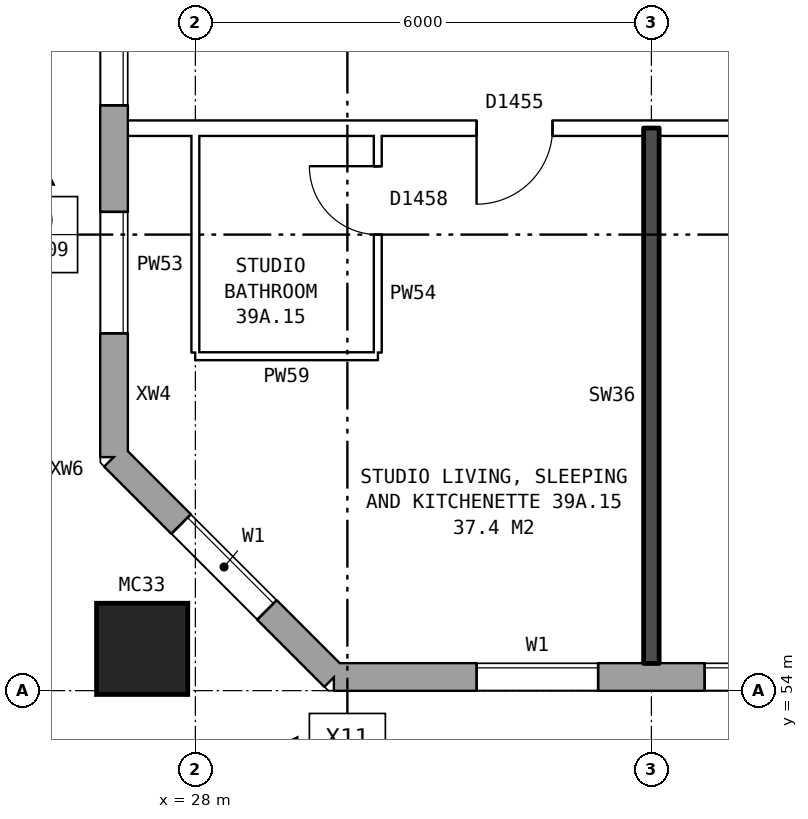
"""IFC4 building model, lengths in metres.
Left out: names, types, materials, properties, quantities, classifications, styles, units other than length and angle.
Written with IfcOpenShell. Run it as: python <this file> out.ifc"""

import sys

from ifc_helpers import new_model, si_unit, direction, frame, frame_2d, origin, origin_2d, place, context, subcontext, project, spatial, rectangle, hollow_rectangle, extrude, element, fill, save


model = new_model("IFC4")
c1 = context("Model", 3, precision=1e-05, world=origin(), true_north=direction((0.0, 1.0)))
c2 = subcontext(c1, "Body", "Model", "MODEL_VIEW")
j1 = project(units=[si_unit("LENGTHUNIT", "METRE"), si_unit("PLANEANGLEUNIT", "RADIAN")], contexts=[c1])
p1 = place(None, origin())
s1 = spatial("IfcSite", under=j1, at=p1, CompositionType="ELEMENT")
p2 = place(p1, origin())
s2 = spatial("IfcBuilding", under=s1, at=p2, CompositionType="ELEMENT")
p3 = place(p2, frame((0.0, 0.0, 139.2)))
s3 = spatial("IfcBuildingStorey", under=s2, at=p3, CompositionType="ELEMENT", Elevation=139.2)
p4 = place(p3, frame((27.3, 54.55, 0.0), z_axis=(0.0, 0.0, 1.0), x_axis=(1.0, 0.0, 0.0)))
e1 = element("IfcColumn", 1, at=p4, inside=s3, PredefinedType="COLUMN", context=c2, shape_type="SweptSolid", body=[
    extrude(hollow_rectangle(XDim=1.2, YDim=1.2, WallThickness=0.065, at=origin_2d()), origin(), (0.0, 0.0, 1.0), 3.1),
])
p5 = place(p3, frame((26.93, 57.075, 0.0), z_axis=(0.0, 0.0, 1.0), x_axis=(0.707106781187, -0.707106781187, 0.0)))
e2 = element("IfcWall", 2, at=p5, inside=s3, PredefinedType="STANDARD", context=c2, shape_type="SweptSolid", body=[
    extrude(rectangle(XDim=4.094, YDim=0.36, at=frame_2d((2.047, 0.0))), origin(), (0.0, 0.0, 1.0), 2.85),
])
p6 = place(p5, frame((1.247, 0.0, 0.8)))
e3 = element("IfcOpeningElement", 3, at=p6, cuts=e2, PredefinedType="OPENING", context=c2, shape_type="SweptSolid", body=[
    extrude(rectangle(XDim=1.6, YDim=1.8, at=frame_2d((0.8, 0.9))), frame((0.0, 0.19, 0.0), z_axis=(0.0, -1.0, 0.0), x_axis=(1.0, 0.0, 0.0)), (0.0, 0.0, 1.0), 0.38),
])
p7 = place(p3, frame((29.825, 54.18, 0.0), z_axis=(0.0, 0.0, 1.0), x_axis=(1.0, 0.0, 0.0)))
e4 = element("IfcWall", 4, at=p7, inside=s3, PredefinedType="STANDARD", context=c2, shape_type="SweptSolid", body=[
    extrude(rectangle(XDim=43.101, YDim=0.36, at=frame_2d((21.55, 0.0))), origin(), (0.0, 0.0, 1.0), 2.85),
])
p8 = place(p7, frame((1.875, 0.0, 0.8)))
e5 = element("IfcOpeningElement", 5, at=p8, cuts=e4, PredefinedType="OPENING", context=c2, shape_type="SweptSolid", body=[
    extrude(rectangle(XDim=1.6, YDim=1.8, at=frame_2d((0.8, 0.9))), frame((0.0, 0.19, 0.0), z_axis=(0.0, -1.0, 0.0), x_axis=(1.0, 0.0, 0.0)), (0.0, 0.0, 1.0), 0.38),
])
p9 = place(p7, frame((4.875, 0.0, 0.8)))
e6 = element("IfcOpeningElement", 6, at=p9, cuts=e4, PredefinedType="OPENING", context=c2, shape_type="SweptSolid", body=[
    extrude(rectangle(XDim=1.6, YDim=1.8, at=frame_2d((0.8, 0.9))), frame((0.0, 0.19, 0.0), z_axis=(0.0, -1.0, 0.0), x_axis=(1.0, 0.0, 0.0)), (0.0, 0.0, 1.0), 0.38),
])
p10 = place(p7, frame((7.875, 0.0, 0.8)))
e7 = element("IfcOpeningElement", 7, at=p10, cuts=e4, PredefinedType="OPENING", context=c2, shape_type="SweptSolid", body=[
    extrude(rectangle(XDim=1.6, YDim=1.8, at=frame_2d((0.8, 0.9))), frame((0.0, 0.19, 0.0), z_axis=(0.0, -1.0, 0.0), x_axis=(1.0, 0.0, 0.0)), (0.0, 0.0, 1.0), 0.38),
])
p11 = place(p7, frame((10.875, 0.0, 0.8)))
e8 = element("IfcOpeningElement", 8, at=p11, cuts=e4, PredefinedType="OPENING", context=c2, shape_type="SweptSolid", body=[
    extrude(rectangle(XDim=1.6, YDim=1.8, at=frame_2d((0.8, 0.9))), frame((0.0, 0.19, 0.0), z_axis=(0.0, -1.0, 0.0), x_axis=(1.0, 0.0, 0.0)), (0.0, 0.0, 1.0), 0.38),
])
p12 = place(p7, frame((13.875, 0.0, 0.8)))
e9 = element("IfcOpeningElement", 9, at=p12, cuts=e4, PredefinedType="OPENING", context=c2, shape_type="SweptSolid", body=[
    extrude(rectangle(XDim=1.6, YDim=1.8, at=frame_2d((0.8, 0.9))), frame((0.0, 0.19, 0.0), z_axis=(0.0, -1.0, 0.0), x_axis=(1.0, 0.0, 0.0)), (0.0, 0.0, 1.0), 0.38),
])
p13 = place(p7, frame((16.875, 0.0, 0.8)))
e10 = element("IfcOpeningElement", 10, at=p13, cuts=e4, PredefinedType="OPENING", context=c2, shape_type="SweptSolid", body=[
    extrude(rectangle(XDim=1.6, YDim=1.8, at=frame_2d((0.8, 0.9))), frame((0.0, 0.19, 0.0), z_axis=(0.0, -1.0, 0.0), x_axis=(1.0, 0.0, 0.0)), (0.0, 0.0, 1.0), 0.38),
])
p14 = place(p7, frame((20.975, 0.0, 0.15)))
e11 = element("IfcOpeningElement", 11, at=p14, cuts=e4, PredefinedType="OPENING", context=c2, shape_type="SweptSolid", body=[
    extrude(rectangle(XDim=1.0, YDim=1.5, at=frame_2d((0.5, 0.75))), frame((0.0, 0.19, 0.0), z_axis=(0.0, -1.0, 0.0), x_axis=(1.0, 0.0, 0.0)), (0.0, 0.0, 1.0), 0.38),
])
p15 = place(p7, frame((23.225, 0.0, 1.7)))
e12 = element("IfcOpeningElement", 12, at=p15, cuts=e4, PredefinedType="OPENING", context=c2, shape_type="SweptSolid", body=[
    extrude(rectangle(XDim=0.6, YDim=0.9, at=frame_2d((0.3, 0.45))), frame((0.0, 0.19, 0.0), z_axis=(0.0, -1.0, 0.0), x_axis=(1.0, 0.0, 0.0)), (0.0, 0.0, 1.0), 0.38),
])
p16 = place(p7, frame((25.875, 0.0, 0.8)))
e13 = element("IfcOpeningElement", 13, at=p16, cuts=e4, PredefinedType="OPENING", context=c2, shape_type="SweptSolid", body=[
    extrude(rectangle(XDim=1.6, YDim=1.8, at=frame_2d((0.8, 0.9))), frame((0.0, 0.19, 0.0), z_axis=(0.0, -1.0, 0.0), x_axis=(1.0, 0.0, 0.0)), (0.0, 0.0, 1.0), 0.38),
])
p17 = place(p7, frame((28.875, 0.0, 0.8)))
e14 = element("IfcOpeningElement", 14, at=p17, cuts=e4, PredefinedType="OPENING", context=c2, shape_type="SweptSolid", body=[
    extrude(rectangle(XDim=1.6, YDim=1.8, at=frame_2d((0.8, 0.9))), frame((0.0, 0.19, 0.0), z_axis=(0.0, -1.0, 0.0), x_axis=(1.0, 0.0, 0.0)), (0.0, 0.0, 1.0), 0.38),
])
p18 = place(p7, frame((31.875, 0.0, 0.8)))
e15 = element("IfcOpeningElement", 15, at=p18, cuts=e4, PredefinedType="OPENING", context=c2, shape_type="SweptSolid", body=[
    extrude(rectangle(XDim=1.6, YDim=1.8, at=frame_2d((0.8, 0.9))), frame((0.0, 0.19, 0.0), z_axis=(0.0, -1.0, 0.0), x_axis=(1.0, 0.0, 0.0)), (0.0, 0.0, 1.0), 0.38),
])
p19 = place(p7, frame((34.875, 0.0, 0.8)))
e16 = element("IfcOpeningElement", 16, at=p19, cuts=e4, PredefinedType="OPENING", context=c2, shape_type="SweptSolid", body=[
    extrude(rectangle(XDim=1.6, YDim=1.8, at=frame_2d((0.8, 0.9))), frame((0.0, 0.19, 0.0), z_axis=(0.0, -1.0, 0.0), x_axis=(1.0, 0.0, 0.0)), (0.0, 0.0, 1.0), 0.38),
])
p20 = place(p7, frame((37.875, 0.0, 0.8)))
e17 = element("IfcOpeningElement", 17, at=p20, cuts=e4, PredefinedType="OPENING", context=c2, shape_type="SweptSolid", body=[
    extrude(rectangle(XDim=1.6, YDim=1.8, at=frame_2d((0.8, 0.9))), frame((0.0, 0.19, 0.0), z_axis=(0.0, -1.0, 0.0), x_axis=(1.0, 0.0, 0.0)), (0.0, 0.0, 1.0), 0.38),
])
p21 = place(p7, frame((40.875, 0.0, 0.8)))
e18 = element("IfcOpeningElement", 18, at=p21, cuts=e4, PredefinedType="OPENING", context=c2, shape_type="SweptSolid", body=[
    extrude(rectangle(XDim=1.6, YDim=1.8, at=frame_2d((0.8, 0.9))), frame((0.0, 0.19, 0.0), z_axis=(0.0, -1.0, 0.0), x_axis=(1.0, 0.0, 0.0)), (0.0, 0.0, 1.0), 0.38),
])
p22 = place(p7, frame((24.225, 0.0, 0.8)))
e19 = element("IfcOpeningElement", 19, at=p22, cuts=e4, PredefinedType="OPENING", context=c2, shape_type="SweptSolid", body=[
    extrude(rectangle(XDim=0.8, YDim=1.8, at=frame_2d((0.4, 0.9))), frame((0.0, 0.19, 0.0), z_axis=(0.0, -1.0, 0.0), x_axis=(1.0, 0.0, 0.0)), (0.0, 0.0, 1.0), 0.38),
])
p23 = place(p3, frame((26.93, 82.925, 0.0), z_axis=(0.0, 0.0, 1.0), x_axis=(0.0, -1.0, 0.0)))
e20 = element("IfcWall", 20, at=p23, inside=s3, PredefinedType="STANDARD", context=c2, shape_type="SweptSolid", body=[
    extrude(rectangle(XDim=25.851, YDim=0.36, at=frame_2d((12.925, 0.0))), origin(), (0.0, 0.0, 1.0), 2.85),
])
p24 = place(p23, frame((1.625, 0.0, 0.8)))
e21 = element("IfcOpeningElement", 21, at=p24, cuts=e20, PredefinedType="OPENING", context=c2, shape_type="SweptSolid", body=[
    extrude(rectangle(XDim=1.6, YDim=1.8, at=frame_2d((0.8, 0.9))), frame((0.0, 0.19, 0.0), z_axis=(0.0, -1.0, 0.0), x_axis=(1.0, 0.0, 0.0)), (0.0, 0.0, 1.0), 0.38),
])
p25 = place(p23, frame((4.625, 0.0, 0.8)))
e22 = element("IfcOpeningElement", 22, at=p25, cuts=e20, PredefinedType="OPENING", context=c2, shape_type="SweptSolid", body=[
    extrude(rectangle(XDim=1.6, YDim=1.8, at=frame_2d((0.8, 0.9))), frame((0.0, 0.19, 0.0), z_axis=(0.0, -1.0, 0.0), x_axis=(1.0, 0.0, 0.0)), (0.0, 0.0, 1.0), 0.38),
])
p26 = place(p23, frame((7.625, 0.0, 0.8)))
e23 = element("IfcOpeningElement", 23, at=p26, cuts=e20, PredefinedType="OPENING", context=c2, shape_type="SweptSolid", body=[
    extrude(rectangle(XDim=1.6, YDim=1.8, at=frame_2d((0.8, 0.9))), frame((0.0, 0.19, 0.0), z_axis=(0.0, -1.0, 0.0), x_axis=(1.0, 0.0, 0.0)), (0.0, 0.0, 1.0), 0.38),
])
p27 = place(p23, frame((10.625, 0.0, 0.8)))
e24 = element("IfcOpeningElement", 24, at=p27, cuts=e20, PredefinedType="OPENING", context=c2, shape_type="SweptSolid", body=[
    extrude(rectangle(XDim=1.6, YDim=1.8, at=frame_2d((0.8, 0.9))), frame((0.0, 0.19, 0.0), z_axis=(0.0, -1.0, 0.0), x_axis=(1.0, 0.0, 0.0)), (0.0, 0.0, 1.0), 0.38),
])
p28 = place(p23, frame((13.625, 0.0, 0.8)))
e25 = element("IfcOpeningElement", 25, at=p28, cuts=e20, PredefinedType="OPENING", context=c2, shape_type="SweptSolid", body=[
    extrude(rectangle(XDim=1.6, YDim=1.8, at=frame_2d((0.8, 0.9))), frame((0.0, 0.19, 0.0), z_axis=(0.0, -1.0, 0.0), x_axis=(1.0, 0.0, 0.0)), (0.0, 0.0, 1.0), 0.38),
])
p29 = place(p23, frame((16.625, 0.0, 0.8)))
e26 = element("IfcOpeningElement", 26, at=p29, cuts=e20, PredefinedType="OPENING", context=c2, shape_type="SweptSolid", body=[
    extrude(rectangle(XDim=1.6, YDim=1.8, at=frame_2d((0.8, 0.9))), frame((0.0, 0.19, 0.0), z_axis=(0.0, -1.0, 0.0), x_axis=(1.0, 0.0, 0.0)), (0.0, 0.0, 1.0), 0.38),
])
p30 = place(p23, frame((19.625, 0.0, 0.8)))
e27 = element("IfcOpeningElement", 27, at=p30, cuts=e20, PredefinedType="OPENING", context=c2, shape_type="SweptSolid", body=[
    extrude(rectangle(XDim=1.6, YDim=1.8, at=frame_2d((0.8, 0.9))), frame((0.0, 0.19, 0.0), z_axis=(0.0, -1.0, 0.0), x_axis=(1.0, 0.0, 0.0)), (0.0, 0.0, 1.0), 0.38),
])
p31 = place(p23, frame((22.625, 0.0, 0.8)))
e28 = element("IfcOpeningElement", 28, at=p31, cuts=e20, PredefinedType="OPENING", context=c2, shape_type="SweptSolid", body=[
    extrude(rectangle(XDim=1.6, YDim=1.8, at=frame_2d((0.8, 0.9))), frame((0.0, 0.19, 0.0), z_axis=(0.0, -1.0, 0.0), x_axis=(1.0, 0.0, 0.0)), (0.0, 0.0, 1.0), 0.38),
])
p32 = place(p3, frame((28.0, 58.4, 0.0), z_axis=(0.0, 0.0, 1.0), x_axis=(1.0, 0.0, 0.0)))
e29 = element("IfcWall", 29, at=p32, inside=s3, PredefinedType="PARTITIONING", context=c2, shape_type="SweptSolid", body=[
    extrude(rectangle(XDim=2.4, YDim=0.1, at=frame_2d((1.2, 0.0))), origin(), (0.0, 0.0, 1.0), 2.85),
])
p33 = place(p3, frame((27.11, 61.4, 0.0), z_axis=(0.0, 0.0, 1.0), x_axis=(1.0, 0.0, 0.0)))
e30 = element("IfcWall", 30, at=p33, inside=s3, PredefinedType="PARTITIONING", context=c2, shape_type="SweptSolid", body=[
    extrude(rectangle(XDim=18.79, YDim=0.2, at=frame_2d((9.395, 0.0))), origin(), (0.0, 0.0, 1.0), 2.85),
])
p34 = place(p33, frame((14.19, 0.0, 0.0)))
e31 = element("IfcOpeningElement", 31, at=p34, cuts=e30, PredefinedType="OPENING", context=c2, shape_type="SweptSolid", body=[
    extrude(rectangle(XDim=1.0, YDim=2.1, at=frame_2d((0.5, 1.05))), frame((0.0, 0.11, 0.0), z_axis=(0.0, -1.0, 0.0), x_axis=(1.0, 0.0, 0.0)), (0.0, 0.0, 1.0), 0.22),
])
p35 = place(p33, frame((8.19, 0.0, 0.0)))
e32 = element("IfcOpeningElement", 32, at=p35, cuts=e30, PredefinedType="OPENING", context=c2, shape_type="SweptSolid", body=[
    extrude(rectangle(XDim=1.0, YDim=2.1, at=frame_2d((0.5, 1.05))), frame((0.0, 0.11, 0.0), z_axis=(0.0, -1.0, 0.0), x_axis=(1.0, 0.0, 0.0)), (0.0, 0.0, 1.0), 0.22),
])
p36 = place(p33, frame((4.59, 0.0, 0.0)))
e33 = element("IfcOpeningElement", 33, at=p36, cuts=e30, PredefinedType="OPENING", context=c2, shape_type="SweptSolid", body=[
    extrude(rectangle(XDim=1.0, YDim=2.1, at=frame_2d((0.5, 1.05))), frame((0.0, 0.11, 0.0), z_axis=(0.0, -1.0, 0.0), x_axis=(1.0, 0.0, 0.0)), (0.0, 0.0, 1.0), 0.22),
])
p37 = place(p3, frame((28.0, 58.45, 0.0), z_axis=(0.0, 0.0, 1.0), x_axis=(0.0, 1.0, 0.0)))
e34 = element("IfcWall", 34, at=p37, inside=s3, PredefinedType="PARTITIONING", context=c2, shape_type="SweptSolid", body=[
    extrude(rectangle(XDim=2.85, YDim=0.1, at=frame_2d((1.425, 0.0))), origin(), (0.0, 0.0, 1.0), 2.85),
])
p38 = place(p3, frame((30.4, 58.45, 0.0), z_axis=(0.0, 0.0, 1.0), x_axis=(0.0, 1.0, 0.0)))
e35 = element("IfcWall", 35, at=p38, inside=s3, PredefinedType="PARTITIONING", context=c2, shape_type="SweptSolid", body=[
    extrude(rectangle(XDim=2.85, YDim=0.1, at=frame_2d((1.425, 0.0))), origin(), (0.0, 0.0, 1.0), 2.85),
])
p39 = place(p38, frame((1.55, 0.0, 0.0)))
e36 = element("IfcOpeningElement", 36, at=p39, cuts=e35, PredefinedType="OPENING", context=c2, shape_type="SweptSolid", body=[
    extrude(rectangle(XDim=0.9, YDim=2.1, at=frame_2d((0.45, 1.05))), frame((0.0, 0.06, 0.0), z_axis=(0.0, -1.0, 0.0), x_axis=(1.0, 0.0, 0.0)), (0.0, 0.0, 1.0), 0.12),
])
p40 = place(p3, frame((34.0, 54.36, 0.0), z_axis=(0.0, 0.0, 1.0), x_axis=(0.0, 1.0, 0.0)))
e37 = element("IfcWall", 37, at=p40, inside=s3, PredefinedType="SOLIDWALL", context=c2, shape_type="SweptSolid", body=[
    extrude(rectangle(XDim=7.04, YDim=0.2, at=frame_2d((3.52, 0.0))), origin(), (0.0, 0.0, 1.0), 2.85),
])
p41 = place(p6, origin())
e38 = element("IfcWindow", 38, at=p41, inside=s3, PartitioningType="SINGLE_PANEL", PredefinedType="WINDOW", context=c2, shape_type="SweptSolid", body=[
    extrude(rectangle(XDim=1.6, YDim=1.8, at=frame_2d((0.8, 0.9))), frame((0.0, 0.15, 0.0), z_axis=(0.0, -1.0, 0.0), x_axis=(1.0, 0.0, 0.0)), (0.0, 0.0, 1.0), 0.06),
])
fill(e3, e38)
p42 = place(p8, origin())
e39 = element("IfcWindow", 39, at=p42, inside=s3, PartitioningType="SINGLE_PANEL", PredefinedType="WINDOW", context=c2, shape_type="SweptSolid", body=[
    extrude(rectangle(XDim=1.6, YDim=1.8, at=frame_2d((0.8, 0.9))), frame((0.0, 0.15, 0.0), z_axis=(0.0, -1.0, 0.0), x_axis=(1.0, 0.0, 0.0)), (0.0, 0.0, 1.0), 0.06),
])
fill(e5, e39)
p43 = place(p9, origin())
e40 = element("IfcWindow", 40, at=p43, inside=s3, PartitioningType="SINGLE_PANEL", PredefinedType="WINDOW", context=c2, shape_type="SweptSolid", body=[
    extrude(rectangle(XDim=1.6, YDim=1.8, at=frame_2d((0.8, 0.9))), frame((0.0, 0.15, 0.0), z_axis=(0.0, -1.0, 0.0), x_axis=(1.0, 0.0, 0.0)), (0.0, 0.0, 1.0), 0.06),
])
fill(e6, e40)
p44 = place(p30, origin())
e41 = element("IfcWindow", 41, at=p44, inside=s3, PartitioningType="SINGLE_PANEL", PredefinedType="WINDOW", context=c2, shape_type="SweptSolid", body=[
    extrude(rectangle(XDim=1.6, YDim=1.8, at=frame_2d((0.8, 0.9))), frame((0.0, 0.15, 0.0), z_axis=(0.0, -1.0, 0.0), x_axis=(1.0, 0.0, 0.0)), (0.0, 0.0, 1.0), 0.06),
])
fill(e27, e41)
p45 = place(p31, origin())
e42 = element("IfcWindow", 42, at=p45, inside=s3, PartitioningType="SINGLE_PANEL", PredefinedType="WINDOW", context=c2, shape_type="SweptSolid", body=[
    extrude(rectangle(XDim=1.6, YDim=1.8, at=frame_2d((0.8, 0.9))), frame((0.0, 0.15, 0.0), z_axis=(0.0, -1.0, 0.0), x_axis=(1.0, 0.0, 0.0)), (0.0, 0.0, 1.0), 0.06),
])
fill(e28, e42)
p46 = place(p36, frame((1.0, 0.0, 0.0), z_axis=(0.0, 0.0, 1.0), x_axis=(-1.0, 0.0, 0.0)))
e43 = element("IfcDoor", 43, at=p46, inside=s3, OperationType="SINGLE_SWING_RIGHT", PredefinedType="DOOR", context=c2, shape_type="SweptSolid", body=[
    extrude(rectangle(XDim=1.0, YDim=2.1, at=frame_2d((0.5, 1.05))), frame((0.0, 0.025, 0.0), z_axis=(0.0, -1.0, 0.0), x_axis=(1.0, 0.0, 0.0)), (0.0, 0.0, 1.0), 0.05),
])
fill(e33, e43)
p47 = place(p39, origin())
e44 = element("IfcDoor", 44, at=p47, inside=s3, OperationType="SINGLE_SWING_RIGHT", PredefinedType="DOOR", context=c2, shape_type="SweptSolid", body=[
    extrude(rectangle(XDim=0.9, YDim=2.1, at=frame_2d((0.45, 1.05))), frame((0.0, 0.025, 0.0), z_axis=(0.0, -1.0, 0.0), x_axis=(1.0, 0.0, 0.0)), (0.0, 0.0, 1.0), 0.05),
])
fill(e36, e44)
save(model, sys.argv[1])
